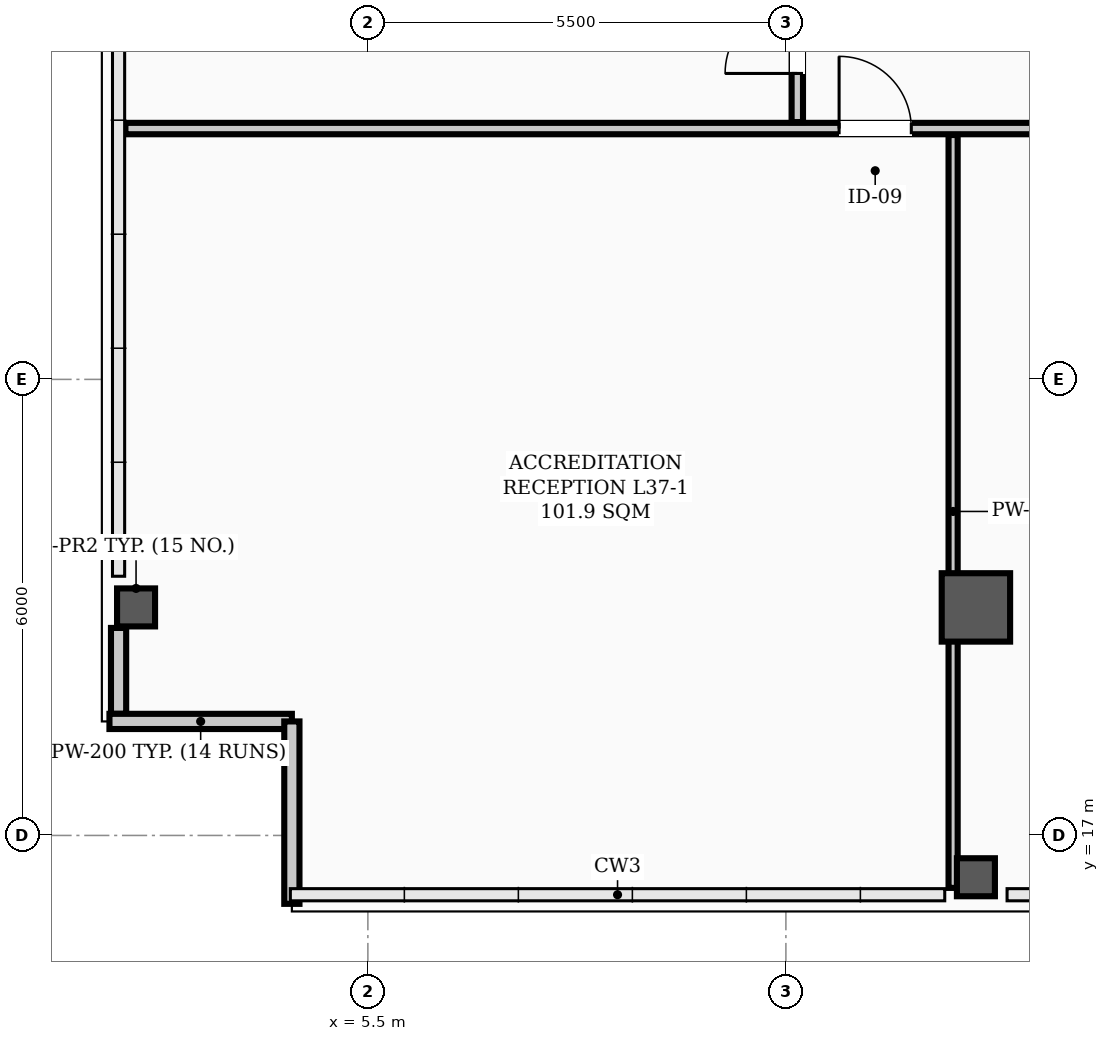
"""IFC4 building model, lengths in metres.
Left out: names, types, materials, properties, quantities, classifications, styles, units other than length and angle.
Written with IfcOpenShell. Run it as: python <this file> out.ifc"""

import sys

from ifc_helpers import new_model, si_unit, direction, frame, frame_2d, origin, origin_2d, place, context, subcontext, project, spatial, rectangle, hollow_rectangle, extrude, element, fill, save


model = new_model("IFC4")
c1 = context("Model", 3, precision=1e-05, world=origin(), true_north=direction((0.0, 1.0)))
c2 = subcontext(c1, "Body", "Model", "MODEL_VIEW")
j1 = project(units=[si_unit("LENGTHUNIT", "METRE"), si_unit("PLANEANGLEUNIT", "RADIAN")], contexts=[c1])
p1 = place(None, origin())
s1 = spatial("IfcSite", under=j1, at=p1, CompositionType="ELEMENT")
p2 = place(p1, origin())
s2 = spatial("IfcBuilding", under=s1, at=p2, CompositionType="ELEMENT")
p3 = place(p2, frame((0.0, 0.0, 150.0)))
s3 = spatial("IfcBuildingStorey", under=s2, at=p3, CompositionType="ELEMENT", Elevation=150.0)
p4 = place(p3, frame((13.5, 20.0, 0.0), z_axis=(0.0, 0.0, 1.0), x_axis=(1.0, 0.0, 0.0)))
e1 = element("IfcColumn", 1, at=p4, inside=s3, PredefinedType="COLUMN", context=c2, shape_type="SweptSolid", body=[
    extrude(hollow_rectangle(XDim=0.9, YDim=0.9, WallThickness=0.035, InnerFilletRadius=0.017, OuterFilletRadius=0.052, at=origin_2d()), origin(), (0.0, 0.0, 1.0), 3.9),
])
for number, where, z_axis, x_axis in (
    (2, (2.45, 20.0, 0.0), (0.0, 0.0, 1.0), (1.0, 0.0, 0.0)),
    (3, (13.5, 16.45, 0.0), (0.0, 0.0, 1.0), (1.0, 0.0, 0.0)),
):
    element("IfcColumn", number, at=place(p3, frame(where, z_axis=z_axis, x_axis=x_axis)), inside=s3, PredefinedType="COLUMN", context=c2, shape_type="SweptSolid", body=[
        extrude(hollow_rectangle(XDim=0.5, YDim=0.5, WallThickness=0.024, InnerFilletRadius=0.012, OuterFilletRadius=0.036, at=origin_2d()), origin(), (0.0, 0.0, 1.0), 3.9),
    ])
p5 = place(p3, frame((2.22, 18.6, 0.0), z_axis=(0.0, 0.0, 1.0), x_axis=(0.0, 1.0, 0.0)))
e4 = element("IfcWall", 4, at=p5, inside=s3, PredefinedType="PARAPET", context=c2, shape_type="SweptSolid", body=[
    extrude(rectangle(XDim=1.13, YDim=0.2, at=frame_2d((0.565, 0.0))), origin(), (0.0, 0.0, 1.0), 1.2),
])
for number, where, z_axis, x_axis in (
    (5, (2.1, 18.5, 0.0), (0.0, 0.0, 1.0), (1.0, 0.0, 0.0)),
    (6, (4.5, 18.5, 0.0), (0.0, 0.0, 1.0), (0.0, -1.0, 0.0)),
):
    element("IfcWall", number, at=place(p3, frame(where, z_axis=z_axis, x_axis=x_axis)), inside=s3, PredefinedType="PARAPET", context=c2, shape_type="SweptSolid", body=[
        extrude(rectangle(XDim=2.4, YDim=0.2, at=frame_2d((1.2, 0.0))), origin(), (0.0, 0.0, 1.0), 1.2),
    ])
p6 = place(p3, frame((2.31, 26.3, 0.0), z_axis=(0.0, 0.0, 1.0), x_axis=(1.0, 0.0, 0.0)))
e7 = element("IfcWall", 7, at=p6, inside=s3, PredefinedType="PARTITIONING", context=c2, shape_type="SweptSolid", body=[
    extrude(rectangle(XDim=46.38, YDim=0.15, at=frame_2d((23.19, 0.0))), origin(), (0.0, 0.0, 1.0), 3.2),
])
p7 = place(p6, frame((9.39, 0.0, 0.0)))
e8 = element("IfcOpeningElement", 8, at=p7, cuts=e7, PredefinedType="OPENING", context=c2, shape_type="SweptSolid", body=[
    extrude(rectangle(XDim=0.95, YDim=2.08, at=frame_2d((0.475, 1.04))), frame((0.0, 0.085, 0.0), z_axis=(0.0, -1.0, 0.0), x_axis=(1.0, 0.0, 0.0)), (0.0, 0.0, 1.0), 0.17),
])
p8 = place(p6, frame((14.215, 0.0, 0.0)))
e9 = element("IfcOpeningElement", 9, at=p8, cuts=e7, PredefinedType="OPENING", context=c2, shape_type="SweptSolid", body=[
    extrude(rectangle(XDim=0.95, YDim=2.08, at=frame_2d((0.475, 1.04))), frame((0.0, 0.085, 0.0), z_axis=(0.0, -1.0, 0.0), x_axis=(1.0, 0.0, 0.0)), (0.0, 0.0, 1.0), 0.17),
])
p9 = place(p6, frame((19.115, 0.0, 0.0)))
e10 = element("IfcOpeningElement", 10, at=p9, cuts=e7, PredefinedType="OPENING", context=c2, shape_type="SweptSolid", body=[
    extrude(rectangle(XDim=0.95, YDim=2.08, at=frame_2d((0.475, 1.04))), frame((0.0, 0.085, 0.0), z_axis=(0.0, -1.0, 0.0), x_axis=(1.0, 0.0, 0.0)), (0.0, 0.0, 1.0), 0.17),
])
p10 = place(p6, frame((23.065, 0.0, 0.0)))
e11 = element("IfcOpeningElement", 11, at=p10, cuts=e7, PredefinedType="OPENING", context=c2, shape_type="SweptSolid", body=[
    extrude(rectangle(XDim=0.95, YDim=2.08, at=frame_2d((0.475, 1.04))), frame((0.0, 0.085, 0.0), z_axis=(0.0, -1.0, 0.0), x_axis=(1.0, 0.0, 0.0)), (0.0, 0.0, 1.0), 0.17),
])
p11 = place(p6, frame((37.715, 0.0, 0.0)))
e12 = element("IfcOpeningElement", 12, at=p11, cuts=e7, PredefinedType="OPENING", context=c2, shape_type="SweptSolid", body=[
    extrude(rectangle(XDim=0.95, YDim=2.08, at=frame_2d((0.475, 1.04))), frame((0.0, 0.085, 0.0), z_axis=(0.0, -1.0, 0.0), x_axis=(1.0, 0.0, 0.0)), (0.0, 0.0, 1.0), 0.17),
])
p12 = place(p6, frame((43.66, 0.0, 0.0)))
e13 = element("IfcOpeningElement", 13, at=p12, cuts=e7, PredefinedType="OPENING", context=c2, shape_type="SweptSolid", body=[
    extrude(rectangle(XDim=0.95, YDim=2.08, at=frame_2d((0.475, 1.04))), frame((0.0, 0.085, 0.0), z_axis=(0.0, -1.0, 0.0), x_axis=(1.0, 0.0, 0.0)), (0.0, 0.0, 1.0), 0.17),
])
p13 = place(p3, frame((11.15, 26.385, 0.0), z_axis=(0.0, 0.0, 1.0), x_axis=(0.0, 1.0, 0.0)))
e14 = element("IfcWall", 14, at=p13, inside=s3, PredefinedType="PARTITIONING", context=c2, shape_type="SweptSolid", body=[
    extrude(rectangle(XDim=13.58, YDim=0.15, at=frame_2d((6.79, 0.0))), origin(), (0.0, 0.0, 1.0), 3.1),
])
p14 = place(p13, frame((0.64, 0.0, 0.0)))
e15 = element("IfcOpeningElement", 15, at=p14, cuts=e14, PredefinedType="OPENING", context=c2, shape_type="SweptSolid", body=[
    extrude(rectangle(XDim=0.95, YDim=2.08, at=frame_2d((0.475, 1.04))), frame((0.0, 0.085, 0.0), z_axis=(0.0, -1.0, 0.0), x_axis=(1.0, 0.0, 0.0)), (0.0, 0.0, 1.0), 0.17),
])
p15 = place(p13, frame((6.94, 0.0, 0.0)))
e16 = element("IfcOpeningElement", 16, at=p15, cuts=e14, PredefinedType="OPENING", context=c2, shape_type="SweptSolid", body=[
    extrude(rectangle(XDim=0.95, YDim=2.08, at=frame_2d((0.475, 1.04))), frame((0.0, 0.085, 0.0), z_axis=(0.0, -1.0, 0.0), x_axis=(1.0, 0.0, 0.0)), (0.0, 0.0, 1.0), 0.17),
])
p16 = place(p13, frame((11.065, 0.0, 0.0)))
e17 = element("IfcOpeningElement", 17, at=p16, cuts=e14, PredefinedType="OPENING", context=c2, shape_type="SweptSolid", body=[
    extrude(rectangle(XDim=0.95, YDim=2.08, at=frame_2d((0.475, 1.04))), frame((0.0, 0.085, 0.0), z_axis=(0.0, -1.0, 0.0), x_axis=(1.0, 0.0, 0.0)), (0.0, 0.0, 1.0), 0.17),
])
p17 = place(p3, frame((13.2, 16.31, 0.0), z_axis=(0.0, 0.0, 1.0), x_axis=(0.0, 1.0, 0.0)))
e18 = element("IfcWall", 18, at=p17, inside=s3, PredefinedType="PARTITIONING", context=c2, shape_type="SweptSolid", body=[
    extrude(rectangle(XDim=9.905, YDim=0.12, at=frame_2d((4.953, 0.0))), origin(), (0.0, 0.0, 1.0), 3.1),
])
p18 = place(p7, origin())
e19 = element("IfcDoor", 19, at=p18, inside=s3, OperationType="SINGLE_SWING_LEFT", PredefinedType="DOOR", context=c2, shape_type="SweptSolid", body=[
    extrude(rectangle(XDim=0.95, YDim=2.08, at=frame_2d((0.475, 1.04))), frame((0.0, 0.025, 0.0), z_axis=(0.0, -1.0, 0.0), x_axis=(1.0, 0.0, 0.0)), (0.0, 0.0, 1.0), 0.05),
])
fill(e8, e19)
p19 = place(p14, origin())
e20 = element("IfcDoor", 20, at=p19, inside=s3, OperationType="SINGLE_SWING_LEFT", PredefinedType="DOOR", context=c2, shape_type="SweptSolid", body=[
    extrude(rectangle(XDim=0.95, YDim=2.08, at=frame_2d((0.475, 1.04))), frame((0.0, 0.025, 0.0), z_axis=(0.0, -1.0, 0.0), x_axis=(1.0, 0.0, 0.0)), (0.0, 0.0, 1.0), 0.05),
])
fill(e15, e20)
save(model, sys.argv[1])
